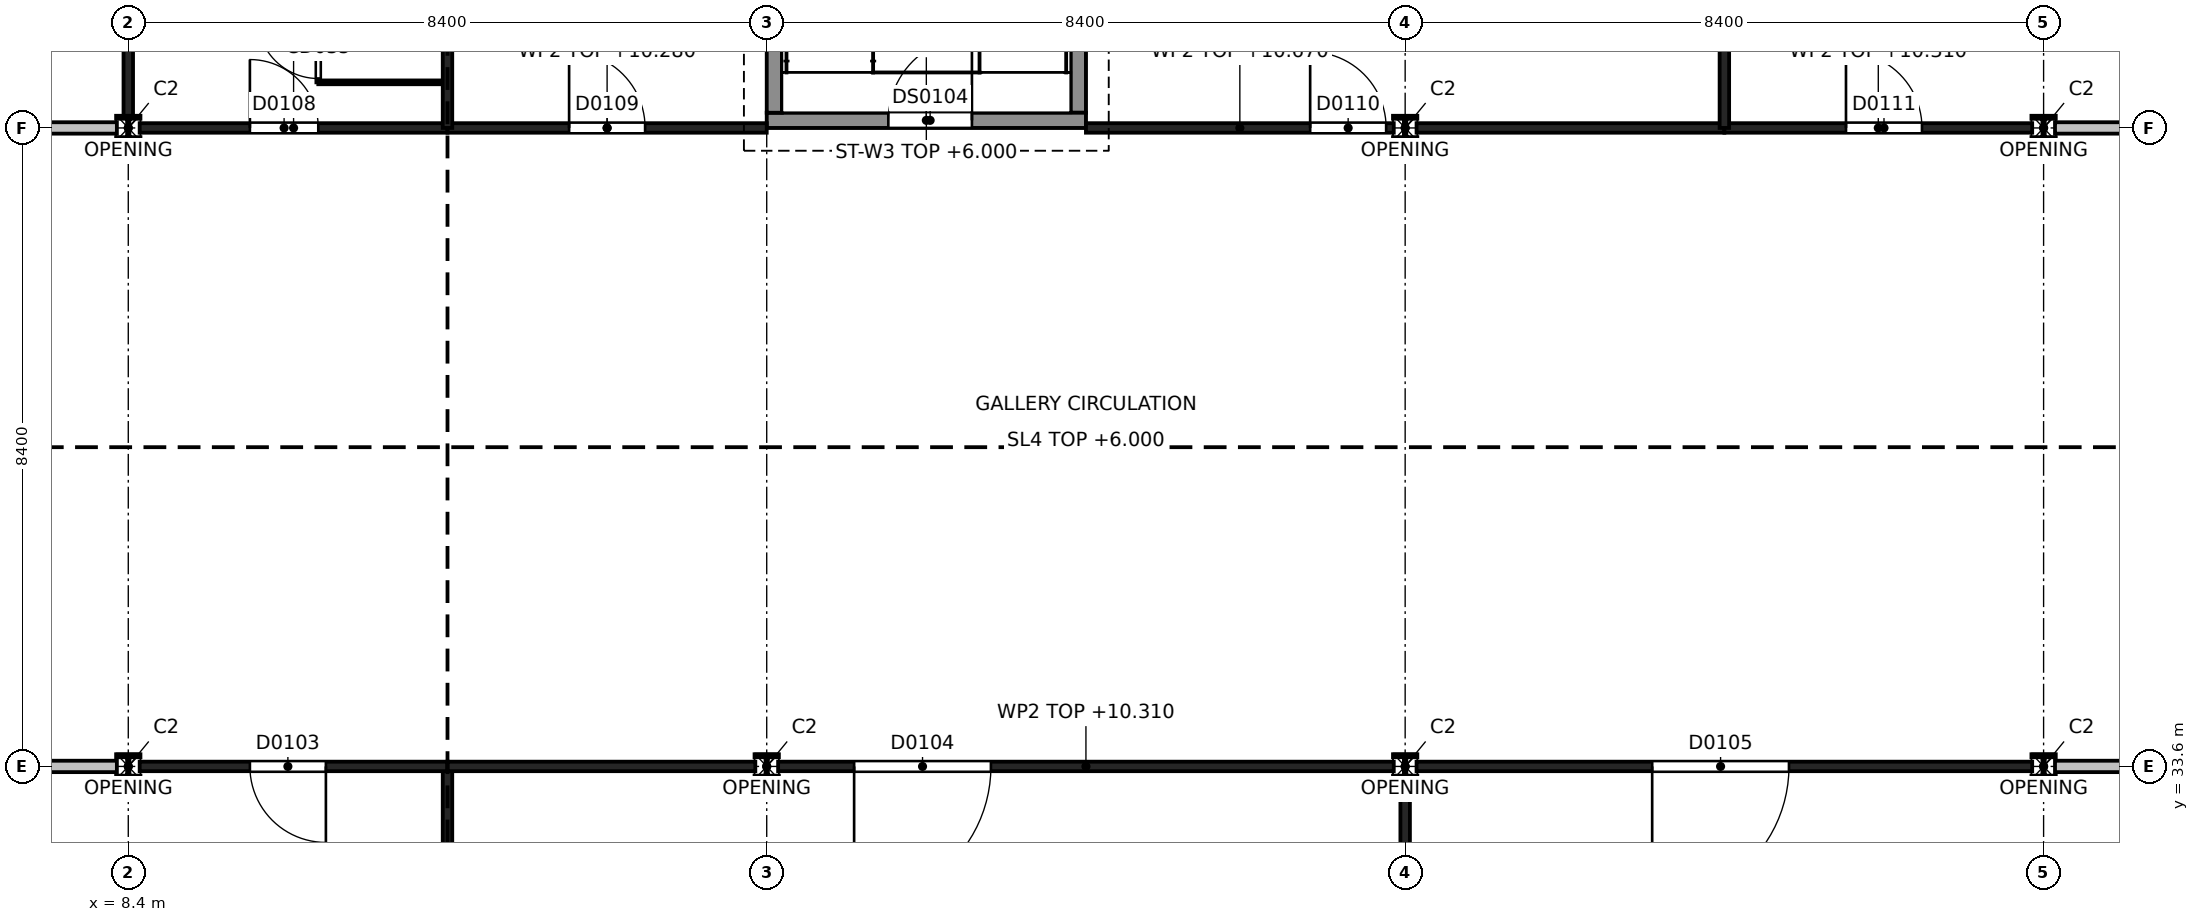
"""IFC4 building model, lengths in metres.
Left out: names, types, materials, properties, quantities, classifications, styles, units other than length and angle.
Written with IfcOpenShell. Run it as: python <this file> out.ifc"""

import sys

from ifc_helpers import new_model, si_unit, direction, frame, frame_2d, origin, origin_2d, place, context, subcontext, project, spatial, rectangle, i_section, extrude, element, fill, save


model = new_model("IFC4")
c1 = context("Model", 3, precision=1e-05, world=origin(), true_north=direction((0.0, 1.0)))
c2 = subcontext(c1, "Body", "Model", "MODEL_VIEW")
j1 = project(units=[si_unit("LENGTHUNIT", "METRE"), si_unit("PLANEANGLEUNIT", "RADIAN")], contexts=[c1])
p1 = place(None, origin())
s1 = spatial("IfcSite", under=j1, at=p1, CompositionType="ELEMENT")
p2 = place(p1, origin())
s2 = spatial("IfcBuilding", under=s1, at=p2, CompositionType="ELEMENT")
p3 = place(p2, frame((0.0, 0.0, 6.0)))
s3 = spatial("IfcBuildingStorey", under=s2, at=p3, CompositionType="ELEMENT", Elevation=6.0)
for number, where, z_axis, x_axis in (
    (1, (8.4, 33.6, 0.0), (0.0, 0.0, 1.0), (1.0, 0.0, 0.0)),
    (2, (8.4, 42.0, 0.0), (0.0, 0.0, 1.0), (1.0, 0.0, 0.0)),
    (3, (16.8, 33.6, 0.0), (0.0, 0.0, 1.0), (1.0, 0.0, 0.0)),
    (4, (25.2, 33.6, 0.0), (0.0, 0.0, 1.0), (1.0, 0.0, 0.0)),
    (5, (25.2, 42.0, 0.0), (0.0, 0.0, 1.0), (1.0, 0.0, 0.0)),
    (6, (33.6, 33.6, 0.0), (0.0, 0.0, 1.0), (1.0, 0.0, 0.0)),
    (7, (33.6, 42.0, 0.0), (0.0, 0.0, 1.0), (1.0, 0.0, 0.0)),
):
    element("IfcColumn", number, at=place(p3, frame(where, z_axis=z_axis, x_axis=x_axis)), inside=s3, PredefinedType="COLUMN", context=c2, shape_type="SweptSolid", body=[
        extrude(i_section(OverallWidth=0.3, OverallDepth=0.3, WebThickness=0.011, FlangeThickness=0.019, at=origin_2d()), origin(), (0.0, 0.0, 1.0), 4.8),
    ])
p4 = place(p3, frame((16.8, 42.1, 0.0), z_axis=(0.0, 0.0, 1.0), x_axis=(1.0, 0.0, 0.0)))
e8 = element("IfcWall", 8, at=p4, inside=s3, PredefinedType="SHEAR", context=c2, shape_type="SweptSolid", body=[
    extrude(rectangle(XDim=4.2, YDim=0.2, at=frame_2d((2.1, 0.0))), origin(), (0.0, 0.0, 1.0), 4.8),
])
p5 = place(p4, frame((1.6, 0.0, 0.0)))
e9 = element("IfcOpeningElement", 9, at=p5, cuts=e8, PredefinedType="OPENING", context=c2, shape_type="SweptSolid", body=[
    extrude(rectangle(XDim=1.1, YDim=2.1, at=frame_2d((0.55, 1.05))), frame((0.0, 0.1, 0.0), z_axis=(0.0, -1.0, 0.0), x_axis=(1.0, 0.0, 0.0)), (0.0, 0.0, 1.0), 0.2),
])
for number, where, z_axis, x_axis in (
    (10, (16.9, 42.2, 0.0), (0.0, 0.0, 1.0), (0.0, 1.0, 0.0)),
    (11, (20.9, 42.2, 0.0), (0.0, 0.0, 1.0), (0.0, 1.0, 0.0)),
):
    element("IfcWall", number, at=place(p3, frame(where, z_axis=z_axis, x_axis=x_axis)), inside=s3, PredefinedType="SHEAR", context=c2, shape_type="SweptSolid", body=[
        extrude(rectangle(XDim=8.0, YDim=0.2, at=frame_2d((4.0, 0.0))), origin(), (0.0, 0.0, 1.0), 4.8),
    ])
p6 = place(p3, frame((12.6, 25.44, 0.0), z_axis=(0.0, 0.0, 1.0), x_axis=(0.0, 1.0, 0.0)))
e12 = element("IfcWall", 12, at=p6, inside=s3, PredefinedType="PARTITIONING", context=c2, shape_type="SweptSolid", body=[
    extrude(rectangle(XDim=8.16, YDim=0.125, at=frame_2d((4.08, 0.0))), origin(), (0.0, 0.0, 1.0), 4.31),
])
p7 = place(p3, frame((0.15, 33.6, 0.0), z_axis=(0.0, 0.0, 1.0), x_axis=(1.0, 0.0, 0.0)))
e13 = element("IfcWall", 13, at=p7, inside=s3, PredefinedType="PARTITIONING", context=c2, shape_type="SweptSolid", body=[
    extrude(rectangle(XDim=8.1, YDim=0.15, at=frame_2d((4.05, 0.0))), origin(), (0.0, 0.0, 1.0), 4.31),
])
p8 = place(p3, frame((8.55, 33.6, 0.0), z_axis=(0.0, 0.0, 1.0), x_axis=(1.0, 0.0, 0.0)))
e14 = element("IfcWall", 14, at=p8, inside=s3, PredefinedType="PARTITIONING", context=c2, shape_type="SweptSolid", body=[
    extrude(rectangle(XDim=4.05, YDim=0.125, at=frame_2d((2.025, 0.0))), origin(), (0.0, 0.0, 1.0), 4.31),
])
p9 = place(p8, frame((1.45, 0.0, 0.0)))
e15 = element("IfcOpeningElement", 15, at=p9, cuts=e14, PredefinedType="OPENING", context=c2, shape_type="SweptSolid", body=[
    extrude(rectangle(XDim=1.0, YDim=2.2, at=frame_2d((0.5, 1.1))), frame((0.0, 0.062, 0.0), z_axis=(0.0, -1.0, 0.0), x_axis=(1.0, 0.0, 0.0)), (0.0, 0.0, 1.0), 0.125),
])
p10 = place(p3, frame((25.2, 25.35, 0.0), z_axis=(0.0, 0.0, 1.0), x_axis=(0.0, 1.0, 0.0)))
e16 = element("IfcWall", 16, at=p10, inside=s3, PredefinedType="PARTITIONING", context=c2, shape_type="SweptSolid", body=[
    extrude(rectangle(XDim=8.1, YDim=0.125, at=frame_2d((4.05, 0.0))), origin(), (0.0, 0.0, 1.0), 4.28),
])
p11 = place(p3, frame((12.6, 33.6, 0.0), z_axis=(0.0, 0.0, 1.0), x_axis=(1.0, 0.0, 0.0)))
e17 = element("IfcWall", 17, at=p11, inside=s3, PredefinedType="PARTITIONING", context=c2, shape_type="SweptSolid", body=[
    extrude(rectangle(XDim=4.05, YDim=0.125, at=frame_2d((2.025, 0.0))), origin(), (0.0, 0.0, 1.0), 4.31),
])
p12 = place(p3, frame((16.95, 33.6, 0.0), z_axis=(0.0, 0.0, 1.0), x_axis=(1.0, 0.0, 0.0)))
e18 = element("IfcWall", 18, at=p12, inside=s3, PredefinedType="PARTITIONING", context=c2, shape_type="SweptSolid", body=[
    extrude(rectangle(XDim=8.1, YDim=0.125, at=frame_2d((4.05, 0.0))), origin(), (0.0, 0.0, 1.0), 4.31),
])
p13 = place(p12, frame((1.0, 0.0, 0.0)))
e19 = element("IfcOpeningElement", 19, at=p13, cuts=e18, PredefinedType="OPENING", context=c2, shape_type="SweptSolid", body=[
    extrude(rectangle(XDim=1.8, YDim=2.1, at=frame_2d((0.9, 1.05))), frame((0.0, 0.062, 0.0), z_axis=(0.0, -1.0, 0.0), x_axis=(1.0, 0.0, 0.0)), (0.0, 0.0, 1.0), 0.125),
])
p14 = place(p3, frame((25.35, 33.6, 0.0), z_axis=(0.0, 0.0, 1.0), x_axis=(1.0, 0.0, 0.0)))
e20 = element("IfcWall", 20, at=p14, inside=s3, PredefinedType="PARTITIONING", context=c2, shape_type="SweptSolid", body=[
    extrude(rectangle(XDim=8.1, YDim=0.125, at=frame_2d((4.05, 0.0))), origin(), (0.0, 0.0, 1.0), 4.31),
])
p15 = place(p14, frame((3.1, 0.0, 0.0)))
e21 = element("IfcOpeningElement", 21, at=p15, cuts=e20, PredefinedType="OPENING", context=c2, shape_type="SweptSolid", body=[
    extrude(rectangle(XDim=1.8, YDim=2.1, at=frame_2d((0.9, 1.05))), frame((0.0, 0.062, 0.0), z_axis=(0.0, -1.0, 0.0), x_axis=(1.0, 0.0, 0.0)), (0.0, 0.0, 1.0), 0.125),
])
p16 = place(p3, frame((33.75, 33.6, 0.0), z_axis=(0.0, 0.0, 1.0), x_axis=(1.0, 0.0, 0.0)))
e22 = element("IfcWall", 22, at=p16, inside=s3, PredefinedType="PARTITIONING", context=c2, shape_type="SweptSolid", body=[
    extrude(rectangle(XDim=8.25, YDim=0.15, at=frame_2d((4.125, 0.0))), origin(), (0.0, 0.0, 1.0), 4.31),
])
p17 = place(p16, frame((6.1, 0.0, 0.0)))
e23 = element("IfcOpeningElement", 23, at=p17, cuts=e22, PredefinedType="OPENING", context=c2, shape_type="SweptSolid", body=[
    extrude(rectangle(XDim=1.8, YDim=2.1, at=frame_2d((0.9, 1.05))), frame((0.0, 0.075, 0.0), z_axis=(0.0, -1.0, 0.0), x_axis=(1.0, 0.0, 0.0)), (0.0, 0.0, 1.0), 0.15),
])
p18 = place(p3, frame((4.2, 42.0, 0.0), z_axis=(0.0, 0.0, 1.0), x_axis=(1.0, 0.0, 0.0)))
e24 = element("IfcWall", 24, at=p18, inside=s3, PredefinedType="PARTITIONING", context=c2, shape_type="SweptSolid", body=[
    extrude(rectangle(XDim=4.05, YDim=0.15, at=frame_2d((2.025, 0.0))), origin(), (0.0, 0.0, 1.0), 4.67),
])
p19 = place(p18, frame((1.6, 0.0, 0.0)))
e25 = element("IfcOpeningElement", 25, at=p19, cuts=e24, PredefinedType="OPENING", context=c2, shape_type="SweptSolid", body=[
    extrude(rectangle(XDim=1.0, YDim=2.1, at=frame_2d((0.5, 1.05))), frame((0.0, 0.075, 0.0), z_axis=(0.0, -1.0, 0.0), x_axis=(1.0, 0.0, 0.0)), (0.0, 0.0, 1.0), 0.15),
])
p20 = place(p3, frame((8.55, 42.0, 0.0), z_axis=(0.0, 0.0, 1.0), x_axis=(1.0, 0.0, 0.0)))
e26 = element("IfcWall", 26, at=p20, inside=s3, PredefinedType="PARTITIONING", context=c2, shape_type="SweptSolid", body=[
    extrude(rectangle(XDim=4.05, YDim=0.125, at=frame_2d((2.025, 0.0))), origin(), (0.0, 0.0, 1.0), 4.31),
])
p21 = place(p20, frame((1.45, 0.0, 0.0)))
e27 = element("IfcOpeningElement", 27, at=p21, cuts=e26, PredefinedType="OPENING", context=c2, shape_type="SweptSolid", body=[
    extrude(rectangle(XDim=0.9, YDim=2.1, at=frame_2d((0.45, 1.05))), frame((0.0, 0.062, 0.0), z_axis=(0.0, -1.0, 0.0), x_axis=(1.0, 0.0, 0.0)), (0.0, 0.0, 1.0), 0.125),
])
p22 = place(p3, frame((12.6, 42.0, 0.0), z_axis=(0.0, 0.0, 1.0), x_axis=(1.0, 0.0, 0.0)))
e28 = element("IfcWall", 28, at=p22, inside=s3, PredefinedType="PARTITIONING", context=c2, shape_type="SweptSolid", body=[
    extrude(rectangle(XDim=4.2, YDim=0.125, at=frame_2d((2.1, 0.0))), origin(), (0.0, 0.0, 1.0), 4.28),
])
p23 = place(p22, frame((1.6, 0.0, 0.0)))
e29 = element("IfcOpeningElement", 29, at=p23, cuts=e28, PredefinedType="OPENING", context=c2, shape_type="SweptSolid", body=[
    extrude(rectangle(XDim=1.0, YDim=2.2, at=frame_2d((0.5, 1.1))), frame((0.0, 0.062, 0.0), z_axis=(0.0, -1.0, 0.0), x_axis=(1.0, 0.0, 0.0)), (0.0, 0.0, 1.0), 0.125),
])
p24 = place(p3, frame((21.0, 42.0, 0.0), z_axis=(0.0, 0.0, 1.0), x_axis=(1.0, 0.0, 0.0)))
e30 = element("IfcWall", 30, at=p24, inside=s3, PredefinedType="PARTITIONING", context=c2, shape_type="SweptSolid", body=[
    extrude(rectangle(XDim=4.05, YDim=0.125, at=frame_2d((2.025, 0.0))), origin(), (0.0, 0.0, 1.0), 4.67),
])
p25 = place(p24, frame((2.95, 0.0, 0.0)))
e31 = element("IfcOpeningElement", 31, at=p25, cuts=e30, PredefinedType="OPENING", context=c2, shape_type="SweptSolid", body=[
    extrude(rectangle(XDim=1.0, YDim=2.2, at=frame_2d((0.5, 1.1))), frame((0.0, 0.062, 0.0), z_axis=(0.0, -1.0, 0.0), x_axis=(1.0, 0.0, 0.0)), (0.0, 0.0, 1.0), 0.125),
])
p26 = place(p3, frame((25.35, 42.0, 0.0), z_axis=(0.0, 0.0, 1.0), x_axis=(1.0, 0.0, 0.0)))
e32 = element("IfcWall", 32, at=p26, inside=s3, PredefinedType="PARTITIONING", context=c2, shape_type="SweptSolid", body=[
    extrude(rectangle(XDim=4.05, YDim=0.125, at=frame_2d((2.025, 0.0))), origin(), (0.0, 0.0, 1.0), 4.31),
])
p27 = place(p3, frame((29.4, 42.0, 0.0), z_axis=(0.0, 0.0, 1.0), x_axis=(1.0, 0.0, 0.0)))
e33 = element("IfcWall", 33, at=p27, inside=s3, PredefinedType="PARTITIONING", context=c2, shape_type="SweptSolid", body=[
    extrude(rectangle(XDim=4.05, YDim=0.125, at=frame_2d((2.025, 0.0))), origin(), (0.0, 0.0, 1.0), 4.31),
])
p28 = place(p27, frame((1.6, 0.0, 0.0)))
e34 = element("IfcOpeningElement", 34, at=p28, cuts=e33, PredefinedType="OPENING", context=c2, shape_type="SweptSolid", body=[
    extrude(rectangle(XDim=1.0, YDim=2.2, at=frame_2d((0.5, 1.1))), frame((0.0, 0.062, 0.0), z_axis=(0.0, -1.0, 0.0), x_axis=(1.0, 0.0, 0.0)), (0.0, 0.0, 1.0), 0.125),
])
p29 = place(p3, frame((33.75, 42.0, 0.0), z_axis=(0.0, 0.0, 1.0), x_axis=(1.0, 0.0, 0.0)))
e35 = element("IfcWall", 35, at=p29, inside=s3, PredefinedType="PARTITIONING", context=c2, shape_type="SweptSolid", body=[
    extrude(rectangle(XDim=4.05, YDim=0.15, at=frame_2d((2.025, 0.0))), origin(), (0.0, 0.0, 1.0), 4.67),
])
p30 = place(p3, frame((8.4, 42.15, 0.0), z_axis=(0.0, 0.0, 1.0), x_axis=(0.0, 1.0, 0.0)))
e36 = element("IfcWall", 36, at=p30, inside=s3, PredefinedType="PARTITIONING", context=c2, shape_type="SweptSolid", body=[
    extrude(rectangle(XDim=8.1, YDim=0.125, at=frame_2d((4.05, 0.0))), origin(), (0.0, 0.0, 1.0), 4.28),
])
for number, where, z_axis, x_axis in (
    (37, (12.6, 42.0, 0.0), (0.0, 0.0, 1.0), (0.0, 1.0, 0.0)),
    (38, (29.4, 42.0, 0.0), (0.0, 0.0, 1.0), (0.0, 1.0, 0.0)),
):
    element("IfcWall", number, at=place(p3, frame(where, z_axis=z_axis, x_axis=x_axis)), inside=s3, PredefinedType="PARTITIONING", context=c2, shape_type="SweptSolid", body=[
        extrude(rectangle(XDim=8.159, YDim=0.125, at=frame_2d((4.08, 0.0))), origin(), (0.0, 0.0, 1.0), 4.31),
    ])
p31 = place(p3, frame((10.9, 42.6, 0.0), z_axis=(0.0, 0.0, 1.0), x_axis=(0.0, 1.0, 0.0)))
e39 = element("IfcWall", 39, at=p31, inside=s3, PredefinedType="PARTITIONING", context=c2, shape_type="SweptSolid", body=[
    extrude(rectangle(XDim=7.2, YDim=0.05, at=frame_2d((3.6, 0.0))), origin(), (0.0, 0.0, 1.0), 4.67),
])
p32 = place(p31, frame((0.05, 0.0, 0.0)))
e40 = element("IfcOpeningElement", 40, at=p32, cuts=e39, PredefinedType="OPENING", context=c2, shape_type="SweptSolid", body=[
    extrude(rectangle(XDim=0.8, YDim=2.0, at=frame_2d((0.4, 1.0))), frame((0.0, 0.025, 0.0), z_axis=(0.0, -1.0, 0.0), x_axis=(1.0, 0.0, 0.0)), (0.0, 0.0, 1.0), 0.05),
])
p33 = place(p31, frame((0.95, 0.0, 0.0)))
e41 = element("IfcOpeningElement", 41, at=p33, cuts=e39, PredefinedType="OPENING", context=c2, shape_type="SweptSolid", body=[
    extrude(rectangle(XDim=0.8, YDim=2.0, at=frame_2d((0.4, 1.0))), frame((0.0, 0.025, 0.0), z_axis=(0.0, -1.0, 0.0), x_axis=(1.0, 0.0, 0.0)), (0.0, 0.0, 1.0), 0.05),
])
p34 = place(p31, frame((1.85, 0.0, 0.0)))
e42 = element("IfcOpeningElement", 42, at=p34, cuts=e39, PredefinedType="OPENING", context=c2, shape_type="SweptSolid", body=[
    extrude(rectangle(XDim=0.8, YDim=2.0, at=frame_2d((0.4, 1.0))), frame((0.0, 0.025, 0.0), z_axis=(0.0, -1.0, 0.0), x_axis=(1.0, 0.0, 0.0)), (0.0, 0.0, 1.0), 0.05),
])
p35 = place(p31, frame((2.75, 0.0, 0.0)))
e43 = element("IfcOpeningElement", 43, at=p35, cuts=e39, PredefinedType="OPENING", context=c2, shape_type="SweptSolid", body=[
    extrude(rectangle(XDim=0.8, YDim=2.0, at=frame_2d((0.4, 1.0))), frame((0.0, 0.025, 0.0), z_axis=(0.0, -1.0, 0.0), x_axis=(1.0, 0.0, 0.0)), (0.0, 0.0, 1.0), 0.05),
])
p36 = place(p31, frame((3.65, 0.0, 0.0)))
e44 = element("IfcOpeningElement", 44, at=p36, cuts=e39, PredefinedType="OPENING", context=c2, shape_type="SweptSolid", body=[
    extrude(rectangle(XDim=0.8, YDim=2.0, at=frame_2d((0.4, 1.0))), frame((0.0, 0.025, 0.0), z_axis=(0.0, -1.0, 0.0), x_axis=(1.0, 0.0, 0.0)), (0.0, 0.0, 1.0), 0.05),
])
p37 = place(p31, frame((4.55, 0.0, 0.0)))
e45 = element("IfcOpeningElement", 45, at=p37, cuts=e39, PredefinedType="OPENING", context=c2, shape_type="SweptSolid", body=[
    extrude(rectangle(XDim=0.8, YDim=2.0, at=frame_2d((0.4, 1.0))), frame((0.0, 0.025, 0.0), z_axis=(0.0, -1.0, 0.0), x_axis=(1.0, 0.0, 0.0)), (0.0, 0.0, 1.0), 0.05),
])
p38 = place(p31, frame((5.45, 0.0, 0.0)))
e46 = element("IfcOpeningElement", 46, at=p38, cuts=e39, PredefinedType="OPENING", context=c2, shape_type="SweptSolid", body=[
    extrude(rectangle(XDim=0.8, YDim=2.0, at=frame_2d((0.4, 1.0))), frame((0.0, 0.025, 0.0), z_axis=(0.0, -1.0, 0.0), x_axis=(1.0, 0.0, 0.0)), (0.0, 0.0, 1.0), 0.05),
])
p39 = place(p31, frame((6.35, 0.0, 0.0)))
e47 = element("IfcOpeningElement", 47, at=p39, cuts=e39, PredefinedType="OPENING", context=c2, shape_type="SweptSolid", body=[
    extrude(rectangle(XDim=0.8, YDim=2.0, at=frame_2d((0.4, 1.0))), frame((0.0, 0.025, 0.0), z_axis=(0.0, -1.0, 0.0), x_axis=(1.0, 0.0, 0.0)), (0.0, 0.0, 1.0), 0.05),
])
p40 = place(p3, frame((12.6, 42.6, 0.0), z_axis=(0.0, 0.0, 1.0), x_axis=(-1.0, 0.0, 0.0)))
e48 = element("IfcWall", 48, at=p40, inside=s3, PredefinedType="PARTITIONING", context=c2, shape_type="SweptSolid", body=[
    extrude(rectangle(XDim=1.7, YDim=0.05, at=frame_2d((0.85, 0.0))), origin(), (0.0, 0.0, 1.0), 4.67),
])
p41 = place(p9, origin())
e49 = element("IfcDoor", 49, at=p41, inside=s3, OperationType="SINGLE_SWING_RIGHT", PredefinedType="DOOR", context=c2, shape_type="SweptSolid", body=[
    extrude(rectangle(XDim=1.0, YDim=2.2, at=frame_2d((0.5, 1.1))), frame((0.0, 0.025, 0.0), z_axis=(0.0, -1.0, 0.0), x_axis=(1.0, 0.0, 0.0)), (0.0, 0.0, 1.0), 0.05),
])
fill(e15, e49)
p42 = place(p13, origin())
e50 = element("IfcDoor", 50, at=p42, inside=s3, OperationType="DOUBLE_DOOR_DOUBLE_SWING", PredefinedType="DOOR", context=c2, shape_type="SweptSolid", body=[
    extrude(rectangle(XDim=1.8, YDim=2.1, at=frame_2d((0.9, 1.05))), frame((0.0, 0.025, 0.0), z_axis=(0.0, -1.0, 0.0), x_axis=(1.0, 0.0, 0.0)), (0.0, 0.0, 1.0), 0.05),
])
fill(e19, e50)
p43 = place(p15, origin())
e51 = element("IfcDoor", 51, at=p43, inside=s3, OperationType="DOUBLE_DOOR_DOUBLE_SWING", PredefinedType="DOOR", context=c2, shape_type="SweptSolid", body=[
    extrude(rectangle(XDim=1.8, YDim=2.1, at=frame_2d((0.9, 1.05))), frame((0.0, 0.025, 0.0), z_axis=(0.0, -1.0, 0.0), x_axis=(1.0, 0.0, 0.0)), (0.0, 0.0, 1.0), 0.05),
])
fill(e21, e51)
p44 = place(p21, origin())
e52 = element("IfcDoor", 52, at=p44, inside=s3, OperationType="SINGLE_SWING_LEFT", PredefinedType="DOOR", context=c2, shape_type="SweptSolid", body=[
    extrude(rectangle(XDim=0.9, YDim=2.1, at=frame_2d((0.45, 1.05))), frame((0.0, 0.025, 0.0), z_axis=(0.0, -1.0, 0.0), x_axis=(1.0, 0.0, 0.0)), (0.0, 0.0, 1.0), 0.05),
])
fill(e27, e52)
p45 = place(p23, origin())
e53 = element("IfcDoor", 53, at=p45, inside=s3, OperationType="SINGLE_SWING_LEFT", PredefinedType="DOOR", context=c2, shape_type="SweptSolid", body=[
    extrude(rectangle(XDim=1.0, YDim=2.2, at=frame_2d((0.5, 1.1))), frame((0.0, 0.025, 0.0), z_axis=(0.0, -1.0, 0.0), x_axis=(1.0, 0.0, 0.0)), (0.0, 0.0, 1.0), 0.05),
])
fill(e29, e53)
p46 = place(p25, origin())
e54 = element("IfcDoor", 54, at=p46, inside=s3, OperationType="SINGLE_SWING_LEFT", PredefinedType="DOOR", context=c2, shape_type="SweptSolid", body=[
    extrude(rectangle(XDim=1.0, YDim=2.2, at=frame_2d((0.5, 1.1))), frame((0.0, 0.025, 0.0), z_axis=(0.0, -1.0, 0.0), x_axis=(1.0, 0.0, 0.0)), (0.0, 0.0, 1.0), 0.05),
])
fill(e31, e54)
p47 = place(p28, origin())
e55 = element("IfcDoor", 55, at=p47, inside=s3, OperationType="SINGLE_SWING_LEFT", PredefinedType="DOOR", context=c2, shape_type="SweptSolid", body=[
    extrude(rectangle(XDim=1.0, YDim=2.2, at=frame_2d((0.5, 1.1))), frame((0.0, 0.025, 0.0), z_axis=(0.0, -1.0, 0.0), x_axis=(1.0, 0.0, 0.0)), (0.0, 0.0, 1.0), 0.05),
])
fill(e34, e55)
p48 = place(p5, origin())
e56 = element("IfcDoor", 56, at=p48, inside=s3, OperationType="SINGLE_SWING_RIGHT", PredefinedType="DOOR", context=c2, shape_type="SweptSolid", body=[
    extrude(rectangle(XDim=1.1, YDim=2.1, at=frame_2d((0.55, 1.05))), frame((0.0, 0.025, 0.0), z_axis=(0.0, -1.0, 0.0), x_axis=(1.0, 0.0, 0.0)), (0.0, 0.0, 1.0), 0.05),
])
fill(e9, e56)
p49 = place(p32, origin())
e57 = element("IfcDoor", 57, at=p49, inside=s3, OperationType="SINGLE_SWING_RIGHT", PredefinedType="DOOR", context=c2, shape_type="SweptSolid", body=[
    extrude(rectangle(XDim=0.8, YDim=2.0, at=frame_2d((0.4, 1.0))), frame((0.0, 0.025, 0.0), z_axis=(0.0, -1.0, 0.0), x_axis=(1.0, 0.0, 0.0)), (0.0, 0.0, 1.0), 0.05),
])
fill(e40, e57)
save(model, sys.argv[1])
